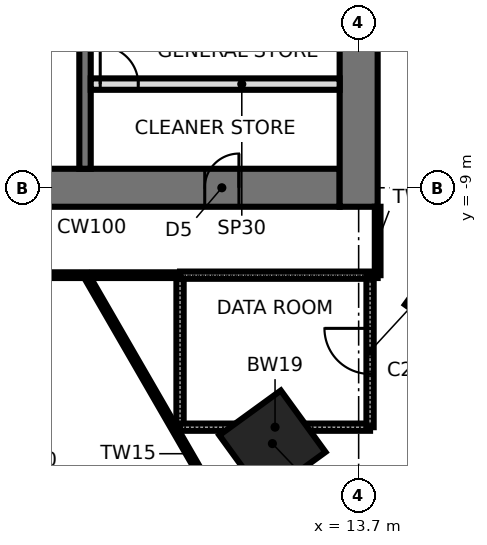
"""IFC4 building model, lengths in metres.
Left out: names, types, materials, properties, quantities, classifications, styles, units other than length and angle.
Written with IfcOpenShell. Run it as: python <this file> out.ifc"""

import sys

from ifc_helpers import new_model, si_unit, direction, frame, frame_2d, origin, origin_2d, place, context, subcontext, project, spatial, rectangle, extrude, element, fill, save


model = new_model("IFC4")
c1 = context("Model", 3, precision=1e-05, world=origin(), true_north=direction((0.0, 1.0)))
c2 = subcontext(c1, "Body", "Model", "MODEL_VIEW")
j1 = project(units=[si_unit("LENGTHUNIT", "METRE"), si_unit("PLANEANGLEUNIT", "RADIAN")], contexts=[c1])
p1 = place(None, origin())
s1 = spatial("IfcSite", under=j1, at=p1, CompositionType="ELEMENT")
p2 = place(p1, origin())
s2 = spatial("IfcBuilding", under=s1, at=p2, CompositionType="ELEMENT")
p3 = place(p2, frame((0.0, 0.0, 82.6)))
s3 = spatial("IfcBuildingStorey", under=s2, at=p3, CompositionType="ELEMENT", Elevation=82.6)
for number, where, z_axis, x_axis in (
    (1, (11.43, -15.733, 0.0), (0.0, 0.0, 1.0), (0.588, -0.809, 0.0)),
    (2, (16.315, -11.854, 0.0), (0.0, 0.0, 1.0), (0.809, -0.588, 0.0)),
):
    element("IfcColumn", number, at=place(p3, frame(where, z_axis=z_axis, x_axis=x_axis)), inside=s3, PredefinedType="COLUMN", context=c2, shape_type="SweptSolid", body=[
        extrude(rectangle(XDim=2.0, YDim=2.0, at=origin_2d()), origin(), (0.0, 0.0, 1.0), 4.2),
    ])
p4 = place(p3, frame((-13.2, -9.0, 0.0), z_axis=(0.0, 0.0, 1.0), x_axis=(1.0, 0.0, 0.0)))
e3 = element("IfcWall", 3, at=p4, inside=s3, PredefinedType="SHEAR", context=c2, shape_type="SweptSolid", body=[
    extrude(rectangle(XDim=26.4, YDim=1.0, at=frame_2d((13.2, 0.0))), origin(), (0.0, 0.0, 1.0), 4.2),
])
p5 = place(p4, frame((2.65, 0.0, 0.0)))
e4 = element("IfcOpeningElement", 4, at=p5, cuts=e3, PredefinedType="OPENING", context=c2, shape_type="SweptSolid", body=[
    extrude(rectangle(XDim=0.9, YDim=2.1, at=frame_2d((0.45, 1.05))), frame((0.0, 0.51, 0.0), z_axis=(0.0, -1.0, 0.0), x_axis=(1.0, 0.0, 0.0)), (0.0, 0.0, 1.0), 1.02),
])
p6 = place(p4, frame((9.5, 0.0, 0.0)))
e5 = element("IfcOpeningElement", 5, at=p6, cuts=e3, PredefinedType="OPENING", context=c2, shape_type="SweptSolid", body=[
    extrude(rectangle(XDim=0.9, YDim=2.1, at=frame_2d((0.45, 1.05))), frame((0.0, 0.51, 0.0), z_axis=(0.0, -1.0, 0.0), x_axis=(1.0, 0.0, 0.0)), (0.0, 0.0, 1.0), 1.02),
])
p7 = place(p4, frame((16.0, 0.0, 0.0)))
e6 = element("IfcOpeningElement", 6, at=p7, cuts=e3, PredefinedType="OPENING", context=c2, shape_type="SweptSolid", body=[
    extrude(rectangle(XDim=0.9, YDim=2.1, at=frame_2d((0.45, 1.05))), frame((0.0, 0.51, 0.0), z_axis=(0.0, -1.0, 0.0), x_axis=(1.0, 0.0, 0.0)), (0.0, 0.0, 1.0), 1.02),
])
p8 = place(p4, frame((22.85, 0.0, 0.0)))
e7 = element("IfcOpeningElement", 7, at=p8, cuts=e3, PredefinedType="OPENING", context=c2, shape_type="SweptSolid", body=[
    extrude(rectangle(XDim=0.9, YDim=2.1, at=frame_2d((0.45, 1.05))), frame((0.0, 0.51, 0.0), z_axis=(0.0, -1.0, 0.0), x_axis=(1.0, 0.0, 0.0)), (0.0, 0.0, 1.0), 1.02),
])
p9 = place(p3, frame((13.7, -9.5, 0.0), z_axis=(0.0, 0.0, 1.0), x_axis=(0.0, 1.0, 0.0)))
e8 = element("IfcWall", 8, at=p9, inside=s3, PredefinedType="SHEAR", context=c2, shape_type="SweptSolid", body=[
    extrude(rectangle(XDim=19.0, YDim=1.0, at=frame_2d((9.5, 0.0))), origin(), (0.0, 0.0, 1.0), 4.2),
])
p10 = place(p9, frame((8.6, 0.0, 0.0)))
e9 = element("IfcOpeningElement", 9, at=p10, cuts=e8, PredefinedType="OPENING", context=c2, shape_type="SweptSolid", body=[
    extrude(rectangle(XDim=1.8, YDim=2.4, at=frame_2d((0.9, 1.2))), frame((0.0, 0.51, 0.0), z_axis=(0.0, -1.0, 0.0), x_axis=(1.0, 0.0, 0.0)), (0.0, 0.0, 1.0), 1.02),
])
p11 = place(p3, frame((6.5, -4.75, 0.0), z_axis=(0.0, 0.0, 1.0), x_axis=(0.0, -1.0, 0.0)))
e10 = element("IfcWall", 10, at=p11, inside=s3, PredefinedType="SHEAR", context=c2, shape_type="SweptSolid", body=[
    extrude(rectangle(XDim=3.75, YDim=0.3, at=frame_2d((1.875, 0.0))), origin(), (0.0, 0.0, 1.0), 4.2),
])
p12 = place(p3, frame((6.65, -6.272, 0.0), z_axis=(0.0, 0.0, 1.0), x_axis=(1.0, 0.0, 0.0)))
e11 = element("IfcWall", 11, at=p12, inside=s3, PredefinedType="PARTITIONING", context=c2, shape_type="SweptSolid", body=[
    extrude(rectangle(XDim=6.55, YDim=0.3, at=frame_2d((3.275, 0.0))), origin(), (0.0, 0.0, 1.0), 4.0),
])
p13 = place(p12, frame((0.25, 0.0, 0.0)))
e12 = element("IfcOpeningElement", 12, at=p13, cuts=e11, PredefinedType="OPENING", context=c2, shape_type="SweptSolid", body=[
    extrude(rectangle(XDim=1.0, YDim=2.4, at=frame_2d((0.5, 1.2))), frame((0.0, 0.16, 0.0), z_axis=(0.0, -1.0, 0.0), x_axis=(1.0, 0.0, 0.0)), (0.0, 0.0, 1.0), 0.32),
])
p14 = place(p3, frame((-16.0, -11.3, 0.0), z_axis=(0.0, 0.0, 1.0), x_axis=(1.0, 0.0, 0.0)))
e13 = element("IfcWall", 13, at=p14, inside=s3, PredefinedType="PARTITIONING", context=c2, shape_type="SweptSolid", body=[
    extrude(rectangle(XDim=25.0, YDim=0.15, at=frame_2d((12.5, 0.0))), origin(), (0.0, 0.0, 1.0), 4.0),
])
p15 = place(p3, frame((11.949, -20.697, 0.0), z_axis=(0.0, 0.0, 1.0), x_axis=(-0.499989292232, 0.866031585829, 0.0)))
e14 = element("IfcWall", 14, at=p15, inside=s3, PredefinedType="PARTITIONING", context=c2, shape_type="SweptSolid", body=[
    extrude(rectangle(XDim=10.85, YDim=0.15, at=frame_2d((5.425, 0.0))), origin(), (0.0, 0.0, 1.0), 4.0),
])
p16 = place(p3, frame((9.0, -11.3, 0.0), z_axis=(0.0, 0.0, 1.0), x_axis=(0.0, -1.0, 0.0)))
e15 = element("IfcWall", 15, at=p16, inside=s3, PredefinedType="SOLIDWALL", context=c2, shape_type="SweptSolid", body=[
    extrude(rectangle(XDim=4.0, YDim=0.19, at=frame_2d((2.0, 0.0))), origin(), (0.0, 0.0, 1.0), 4.0),
])
for number, where, z_axis, x_axis in (
    (16, (9.0, -15.3, 0.0), (0.0, 0.0, 1.0), (1.0, 0.0, 0.0)),
    (17, (14.0, -11.3, 0.0), (0.0, 0.0, 1.0), (-1.0, 0.0, 0.0)),
):
    element("IfcWall", number, at=place(p3, frame(where, z_axis=z_axis, x_axis=x_axis)), inside=s3, PredefinedType="SOLIDWALL", context=c2, shape_type="SweptSolid", body=[
        extrude(rectangle(XDim=5.0, YDim=0.19, at=frame_2d((2.5, 0.0))), origin(), (0.0, 0.0, 1.0), 4.0),
    ])
p17 = place(p3, frame((14.0, -15.3, 0.0), z_axis=(0.0, 0.0, 1.0), x_axis=(0.0, 1.0, 0.0)))
e18 = element("IfcWall", 18, at=p17, inside=s3, PredefinedType="SOLIDWALL", context=c2, shape_type="SweptSolid", body=[
    extrude(rectangle(XDim=4.0, YDim=0.19, at=frame_2d((2.0, 0.0))), origin(), (0.0, 0.0, 1.0), 4.0),
])
p18 = place(p17, frame((1.4, 0.0, 0.0)))
e19 = element("IfcOpeningElement", 19, at=p18, cuts=e18, PredefinedType="OPENING", context=c2, shape_type="SweptSolid", body=[
    extrude(rectangle(XDim=1.2, YDim=2.1, at=frame_2d((0.6, 1.05))), frame((0.0, 0.105, 0.0), z_axis=(0.0, -1.0, 0.0), x_axis=(1.0, 0.0, 0.0)), (0.0, 0.0, 1.0), 0.21),
])
p19 = place(p3, frame((14.0, -11.3, 0.0), z_axis=(0.0, 0.0, 1.0), x_axis=(1.0, 0.0, 0.0)))
e20 = element("IfcWall", 20, at=p19, inside=s3, PredefinedType="PARTITIONING", context=c2, shape_type="SweptSolid", body=[
    extrude(rectangle(XDim=0.2, YDim=0.15, at=frame_2d((0.1, 0.0))), origin(), (0.0, 0.0, 1.0), 4.0),
])
p20 = place(p3, frame((14.2, -11.3, 0.0), z_axis=(0.0, 0.0, 1.0), x_axis=(0.0, 1.0, 0.0)))
e21 = element("IfcWall", 21, at=p20, inside=s3, PredefinedType="PARTITIONING", context=c2, shape_type="SweptSolid", body=[
    extrude(rectangle(XDim=1.8, YDim=0.15, at=frame_2d((0.9, 0.0))), origin(), (0.0, 0.0, 1.0), 4.0),
])
p21 = place(p8, origin())
e22 = element("IfcDoor", 22, at=p21, inside=s3, OperationType="SINGLE_SWING_RIGHT", PredefinedType="DOOR", context=c2, shape_type="SweptSolid", body=[
    extrude(rectangle(XDim=0.82, YDim=2.06, at=frame_2d((0.45, 1.03))), frame((0.0, 0.025, 0.0), z_axis=(0.0, -1.0, 0.0), x_axis=(1.0, 0.0, 0.0)), (0.0, 0.0, 1.0), 0.05),
    extrude(rectangle(XDim=0.04, YDim=2.1, at=frame_2d((0.02, 1.05))), frame((0.0, 0.25, 0.0), z_axis=(0.0, -1.0, 0.0), x_axis=(1.0, 0.0, 0.0)), (0.0, 0.0, 1.0), 0.5),
    extrude(rectangle(XDim=0.04, YDim=2.1, at=frame_2d((0.88, 1.05))), frame((0.0, 0.25, 0.0), z_axis=(0.0, -1.0, 0.0), x_axis=(1.0, 0.0, 0.0)), (0.0, 0.0, 1.0), 0.5),
    extrude(rectangle(XDim=0.82, YDim=0.04, at=frame_2d((0.45, 2.08))), frame((0.0, 0.25, 0.0), z_axis=(0.0, -1.0, 0.0), x_axis=(1.0, 0.0, 0.0)), (0.0, 0.0, 1.0), 0.5),
])
fill(e7, e22)
p22 = place(p13, origin())
e23 = element("IfcDoor", 23, at=p22, inside=s3, OperationType="SINGLE_SWING_LEFT", PredefinedType="DOOR", context=c2, shape_type="SweptSolid", body=[
    extrude(rectangle(XDim=1.0, YDim=2.4, at=frame_2d((0.5, 1.2))), frame((0.0, 0.025, 0.0), z_axis=(0.0, -1.0, 0.0), x_axis=(1.0, 0.0, 0.0)), (0.0, 0.0, 1.0), 0.05),
])
fill(e12, e23)
p23 = place(p18, origin())
e24 = element("IfcDoor", 24, at=p23, inside=s3, OperationType="SINGLE_SWING_RIGHT", PredefinedType="DOOR", context=c2, shape_type="SweptSolid", body=[
    extrude(rectangle(XDim=1.2, YDim=2.1, at=frame_2d((0.6, 1.05))), frame((0.0, 0.025, 0.0), z_axis=(0.0, -1.0, 0.0), x_axis=(1.0, 0.0, 0.0)), (0.0, 0.0, 1.0), 0.05),
])
fill(e19, e24)
save(model, sys.argv[1])
